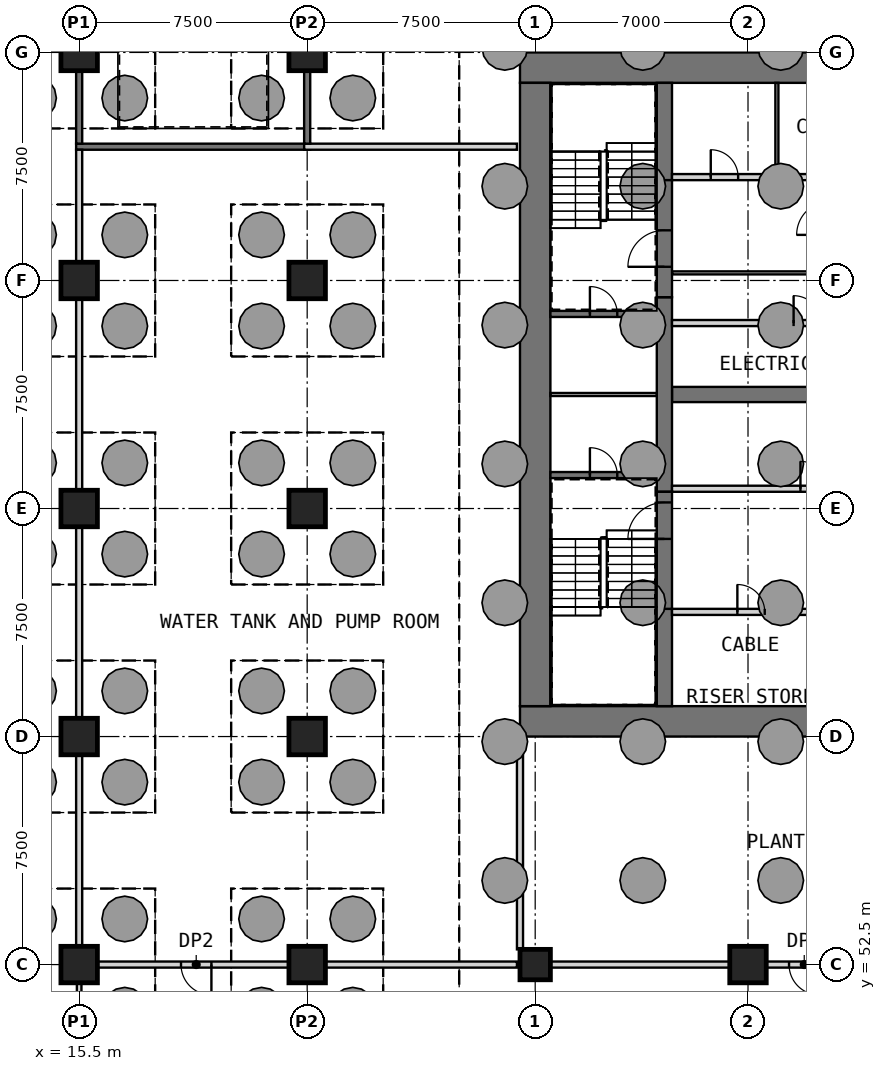
"""IFC4 building model, lengths in metres.
Left out: names, types, materials, properties, quantities, classifications, styles, units other than length and angle.
Written with IfcOpenShell. Run it as: python <this file> out.ifc"""

import sys

from ifc_helpers import new_model, si_unit, direction, frame, frame_2d, origin, origin_2d, place, context, subcontext, project, spatial, rectangle, extrude, element, fill, save


model = new_model("IFC4")
c1 = context("Model", 3, precision=1e-05, world=origin(), true_north=direction((0.0, 1.0)))
c2 = subcontext(c1, "Body", "Model", "MODEL_VIEW")
j1 = project(units=[si_unit("LENGTHUNIT", "METRE"), si_unit("PLANEANGLEUNIT", "RADIAN")], contexts=[c1])
p1 = place(None, origin())
s1 = spatial("IfcSite", under=j1, at=p1, CompositionType="ELEMENT")
p2 = place(p1, origin())
s2 = spatial("IfcBuilding", under=s1, at=p2, CompositionType="ELEMENT")
p3 = place(p2, frame((0.0, 0.0, -12.0)))
s3 = spatial("IfcBuildingStorey", under=s2, at=p3, CompositionType="ELEMENT", Elevation=-12.0)
p4 = place(p3, frame((30.5, 52.5, 0.0), z_axis=(0.0, 0.0, 1.0), x_axis=(1.0, 0.0, 0.0)))
e1 = element("IfcColumn", 1, at=p4, inside=s3, PredefinedType="COLUMN", context=c2, shape_type="SweptSolid", body=[
    extrude(rectangle(XDim=1.0, YDim=1.0, at=origin_2d()), origin(), (0.0, 0.0, 1.0), 6.0),
])
for number, where, z_axis, x_axis in (
    (2, (37.5, 52.5, 0.0), (0.0, 0.0, 1.0), (1.0, 0.0, 0.0)),
    (3, (15.5, 52.5, 0.0), (0.0, 0.0, 1.0), (1.0, 0.0, 0.0)),
    (4, (15.5, 60.0, 0.0), (0.0, 0.0, 1.0), (1.0, 0.0, 0.0)),
    (5, (15.5, 67.5, 0.0), (0.0, 0.0, 1.0), (1.0, 0.0, 0.0)),
    (6, (15.5, 75.0, 0.0), (0.0, 0.0, 1.0), (1.0, 0.0, 0.0)),
    (7, (15.5, 82.5, 0.0), (0.0, 0.0, 1.0), (1.0, 0.0, 0.0)),
    (8, (23.0, 52.5, 0.0), (0.0, 0.0, 1.0), (1.0, 0.0, 0.0)),
    (9, (23.0, 60.0, 0.0), (0.0, 0.0, 1.0), (1.0, 0.0, 0.0)),
    (10, (23.0, 67.5, 0.0), (0.0, 0.0, 1.0), (1.0, 0.0, 0.0)),
    (11, (23.0, 75.0, 0.0), (0.0, 0.0, 1.0), (1.0, 0.0, 0.0)),
    (12, (23.0, 82.5, 0.0), (0.0, 0.0, 1.0), (1.0, 0.0, 0.0)),
):
    element("IfcColumn", number, at=place(p3, frame(where, z_axis=z_axis, x_axis=x_axis)), inside=s3, PredefinedType="COLUMN", context=c2, shape_type="SweptSolid", body=[
        extrude(rectangle(XDim=1.2, YDim=1.2, at=origin_2d()), origin(), (0.0, 0.0, 1.0), 6.0),
    ])
p5 = place(p3, frame((30.0, 60.5, 0.0), z_axis=(0.0, 0.0, 1.0), x_axis=(1.0, 0.0, 0.0)))
e13 = element("IfcWall", 13, at=p5, inside=s3, PredefinedType="SHEAR", context=c2, shape_type="SweptSolid", body=[
    extrude(rectangle(XDim=30.0, YDim=1.0, at=frame_2d((15.0, 0.0))), origin(), (0.0, 0.0, 1.0), 6.0),
])
p6 = place(p5, frame((21.9, 0.0, 0.0)))
e14 = element("IfcOpeningElement", 14, at=p6, cuts=e13, PredefinedType="OPENING", context=c2, shape_type="SweptSolid", body=[
    extrude(rectangle(XDim=1.8, YDim=2.1, at=frame_2d((0.9, 1.05))), frame((0.0, 0.51, 0.0), z_axis=(0.0, -1.0, 0.0), x_axis=(1.0, 0.0, 0.0)), (0.0, 0.0, 1.0), 1.02),
])
p7 = place(p5, frame((26.5, 0.0, 0.0)))
e15 = element("IfcOpeningElement", 15, at=p7, cuts=e13, PredefinedType="OPENING", context=c2, shape_type="SweptSolid", body=[
    extrude(rectangle(XDim=1.2, YDim=2.1, at=frame_2d((0.6, 1.05))), frame((0.0, 0.51, 0.0), z_axis=(0.0, -1.0, 0.0), x_axis=(1.0, 0.0, 0.0)), (0.0, 0.0, 1.0), 1.02),
])
p8 = place(p3, frame((30.0, 82.0, 0.0), z_axis=(0.0, 0.0, 1.0), x_axis=(1.0, 0.0, 0.0)))
e16 = element("IfcWall", 16, at=p8, inside=s3, PredefinedType="SHEAR", context=c2, shape_type="SweptSolid", body=[
    extrude(rectangle(XDim=30.0, YDim=1.0, at=frame_2d((15.0, 0.0))), origin(), (0.0, 0.0, 1.0), 6.0),
])
p9 = place(p3, frame((30.5, 61.0, 0.0), z_axis=(0.0, 0.0, 1.0), x_axis=(0.0, 1.0, 0.0)))
e17 = element("IfcWall", 17, at=p9, inside=s3, PredefinedType="SHEAR", context=c2, shape_type="SweptSolid", body=[
    extrude(rectangle(XDim=20.5, YDim=1.0, at=frame_2d((10.25, 0.0))), origin(), (0.0, 0.0, 1.0), 6.0),
])
p10 = place(p3, frame((35.0, 71.25, 0.0), z_axis=(0.0, 0.0, 1.0), x_axis=(1.0, 0.0, 0.0)))
e18 = element("IfcWall", 18, at=p10, inside=s3, PredefinedType="SHEAR", context=c2, shape_type="SweptSolid", body=[
    extrude(rectangle(XDim=15.6, YDim=0.5, at=frame_2d((7.8, 0.0))), origin(), (0.0, 0.0, 1.0), 6.0),
])
p11 = place(p3, frame((34.75, 61.0, 0.0), z_axis=(0.0, 0.0, 1.0), x_axis=(0.0, 1.0, 0.0)))
e19 = element("IfcWall", 19, at=p11, inside=s3, PredefinedType="SHEAR", context=c2, shape_type="SweptSolid", body=[
    extrude(rectangle(XDim=3.2, YDim=0.5, at=frame_2d((1.6, 0.0))), origin(), (0.0, 0.0, 1.0), 6.0),
])
p12 = place(p3, frame((34.75, 68.05, 0.0), z_axis=(0.0, 0.0, 1.0), x_axis=(0.0, 1.0, 0.0)))
e20 = element("IfcWall", 20, at=p12, inside=s3, PredefinedType="SHEAR", context=c2, shape_type="SweptSolid", body=[
    extrude(rectangle(XDim=6.4, YDim=0.5, at=frame_2d((3.2, 0.0))), origin(), (0.0, 0.0, 1.0), 6.0),
])
p13 = place(p3, frame((34.75, 78.3, 0.0), z_axis=(0.0, 0.0, 1.0), x_axis=(0.0, 1.0, 0.0)))
e21 = element("IfcWall", 21, at=p13, inside=s3, PredefinedType="SHEAR", context=c2, shape_type="SweptSolid", body=[
    extrude(rectangle(XDim=3.2, YDim=0.5, at=frame_2d((1.6, 0.0))), origin(), (0.0, 0.0, 1.0), 6.0),
])
p14 = place(p3, frame((35.0, 64.1, 0.0), z_axis=(0.0, 0.0, 1.0), x_axis=(1.0, 0.0, 0.0)))
e22 = element("IfcWall", 22, at=p14, inside=s3, PredefinedType="PARTITIONING", context=c2, shape_type="SweptSolid", body=[
    extrude(rectangle(XDim=15.6, YDim=0.2, at=frame_2d((7.8, 0.0))), origin(), (0.0, 0.0, 1.0), 5.4),
])
p15 = place(p14, frame((2.15, 0.0, 0.0)))
e23 = element("IfcOpeningElement", 23, at=p15, cuts=e22, PredefinedType="OPENING", context=c2, shape_type="SweptSolid", body=[
    extrude(rectangle(XDim=0.9, YDim=2.1, at=frame_2d((0.45, 1.05))), frame((0.0, 0.11, 0.0), z_axis=(0.0, -1.0, 0.0), x_axis=(1.0, 0.0, 0.0)), (0.0, 0.0, 1.0), 0.22),
])
p16 = place(p14, frame((9.95, 0.0, 0.0)))
e24 = element("IfcOpeningElement", 24, at=p16, cuts=e22, PredefinedType="OPENING", context=c2, shape_type="SweptSolid", body=[
    extrude(rectangle(XDim=0.9, YDim=2.1, at=frame_2d((0.45, 1.05))), frame((0.0, 0.11, 0.0), z_axis=(0.0, -1.0, 0.0), x_axis=(1.0, 0.0, 0.0)), (0.0, 0.0, 1.0), 0.22),
])
p17 = place(p3, frame((35.0, 68.15, 0.0), z_axis=(0.0, 0.0, 1.0), x_axis=(1.0, 0.0, 0.0)))
e25 = element("IfcWall", 25, at=p17, inside=s3, PredefinedType="PARTITIONING", context=c2, shape_type="SweptSolid", body=[
    extrude(rectangle(XDim=15.6, YDim=0.2, at=frame_2d((7.8, 0.0))), origin(), (0.0, 0.0, 1.0), 5.4),
])
p18 = place(p17, frame((4.225, 0.0, 0.0)))
e26 = element("IfcOpeningElement", 26, at=p18, cuts=e25, PredefinedType="OPENING", context=c2, shape_type="SweptSolid", body=[
    extrude(rectangle(XDim=0.9, YDim=2.1, at=frame_2d((0.45, 1.05))), frame((0.0, 0.11, 0.0), z_axis=(0.0, -1.0, 0.0), x_axis=(1.0, 0.0, 0.0)), (0.0, 0.0, 1.0), 0.22),
])
p19 = place(p17, frame((12.025, 0.0, 0.0)))
e27 = element("IfcOpeningElement", 27, at=p19, cuts=e25, PredefinedType="OPENING", context=c2, shape_type="SweptSolid", body=[
    extrude(rectangle(XDim=0.9, YDim=2.1, at=frame_2d((0.45, 1.05))), frame((0.0, 0.11, 0.0), z_axis=(0.0, -1.0, 0.0), x_axis=(1.0, 0.0, 0.0)), (0.0, 0.0, 1.0), 0.22),
])
p20 = place(p3, frame((35.0, 73.6, 0.0), z_axis=(0.0, 0.0, 1.0), x_axis=(1.0, 0.0, 0.0)))
e28 = element("IfcWall", 28, at=p20, inside=s3, PredefinedType="PARTITIONING", context=c2, shape_type="SweptSolid", body=[
    extrude(rectangle(XDim=15.6, YDim=0.2, at=frame_2d((7.8, 0.0))), origin(), (0.0, 0.0, 1.0), 5.4),
])
p21 = place(p20, frame((4.0, 0.0, 0.0)))
e29 = element("IfcOpeningElement", 29, at=p21, cuts=e28, PredefinedType="OPENING", context=c2, shape_type="SweptSolid", body=[
    extrude(rectangle(XDim=0.9, YDim=2.1, at=frame_2d((0.45, 1.05))), frame((0.0, 0.11, 0.0), z_axis=(0.0, -1.0, 0.0), x_axis=(1.0, 0.0, 0.0)), (0.0, 0.0, 1.0), 0.22),
])
p22 = place(p20, frame((11.8, 0.0, 0.0)))
e30 = element("IfcOpeningElement", 30, at=p22, cuts=e28, PredefinedType="OPENING", context=c2, shape_type="SweptSolid", body=[
    extrude(rectangle(XDim=0.9, YDim=2.1, at=frame_2d((0.45, 1.05))), frame((0.0, 0.11, 0.0), z_axis=(0.0, -1.0, 0.0), x_axis=(1.0, 0.0, 0.0)), (0.0, 0.0, 1.0), 0.22),
])
p23 = place(p3, frame((35.0, 78.4, 0.0), z_axis=(0.0, 0.0, 1.0), x_axis=(1.0, 0.0, 0.0)))
e31 = element("IfcWall", 31, at=p23, inside=s3, PredefinedType="PARTITIONING", context=c2, shape_type="SweptSolid", body=[
    extrude(rectangle(XDim=10.4, YDim=0.2, at=frame_2d((5.2, 0.0))), origin(), (0.0, 0.0, 1.0), 5.4),
])
p24 = place(p23, frame((1.275, 0.0, 0.0)))
e32 = element("IfcOpeningElement", 32, at=p24, cuts=e31, PredefinedType="OPENING", context=c2, shape_type="SweptSolid", body=[
    extrude(rectangle(XDim=0.9, YDim=2.1, at=frame_2d((0.45, 1.05))), frame((0.0, 0.11, 0.0), z_axis=(0.0, -1.0, 0.0), x_axis=(1.0, 0.0, 0.0)), (0.0, 0.0, 1.0), 0.22),
])
p25 = place(p23, frame((6.475, 0.0, 0.0)))
e33 = element("IfcOpeningElement", 33, at=p25, cuts=e31, PredefinedType="OPENING", context=c2, shape_type="SweptSolid", body=[
    extrude(rectangle(XDim=0.9, YDim=2.1, at=frame_2d((0.45, 1.05))), frame((0.0, 0.11, 0.0), z_axis=(0.0, -1.0, 0.0), x_axis=(1.0, 0.0, 0.0)), (0.0, 0.0, 1.0), 0.22),
])
p26 = place(p3, frame((38.45, 78.5, 0.0), z_axis=(0.0, 0.0, 1.0), x_axis=(0.0, 1.0, 0.0)))
e34 = element("IfcWall", 34, at=p26, inside=s3, PredefinedType="PARTITIONING", context=c2, shape_type="SweptSolid", body=[
    extrude(rectangle(XDim=3.0, YDim=0.1, at=frame_2d((1.5, 0.0))), origin(), (0.0, 0.0, 1.0), 5.4),
])
p27 = place(p3, frame((35.0, 75.25, 0.0), z_axis=(0.0, 0.0, 1.0), x_axis=(1.0, 0.0, 0.0)))
e35 = element("IfcWall", 35, at=p27, inside=s3, PredefinedType="PARTITIONING", context=c2, shape_type="SweptSolid", body=[
    extrude(rectangle(XDim=5.25, YDim=0.1, at=frame_2d((2.625, 0.0))), origin(), (0.0, 0.0, 1.0), 5.4),
])
p28 = place(p3, frame((34.75, 64.2, 0.0), z_axis=(0.0, 0.0, 1.0), x_axis=(0.0, 1.0, 0.0)))
e36 = element("IfcWall", 36, at=p28, inside=s3, PredefinedType="SOLIDWALL", context=c2, shape_type="SweptSolid", body=[
    extrude(rectangle(XDim=3.85, YDim=0.5, at=frame_2d((1.925, 0.0))), origin(), (0.0, 0.0, 1.0), 4.8),
])
p29 = place(p28, frame((2.3, 0.0, 0.0)))
e37 = element("IfcOpeningElement", 37, at=p29, cuts=e36, PredefinedType="OPENING", context=c2, shape_type="SweptSolid", body=[
    extrude(rectangle(XDim=1.2, YDim=2.1, at=frame_2d((0.6, 1.05))), frame((0.0, 0.26, 0.0), z_axis=(0.0, -1.0, 0.0), x_axis=(1.0, 0.0, 0.0)), (0.0, 0.0, 1.0), 0.52),
])
p30 = place(p3, frame((34.75, 74.45, 0.0), z_axis=(0.0, 0.0, 1.0), x_axis=(0.0, 1.0, 0.0)))
e38 = element("IfcWall", 38, at=p30, inside=s3, PredefinedType="SOLIDWALL", context=c2, shape_type="SweptSolid", body=[
    extrude(rectangle(XDim=3.85, YDim=0.5, at=frame_2d((1.925, 0.0))), origin(), (0.0, 0.0, 1.0), 4.8),
])
p31 = place(p30, frame((1.0, 0.0, 0.0)))
e39 = element("IfcOpeningElement", 39, at=p31, cuts=e38, PredefinedType="OPENING", context=c2, shape_type="SweptSolid", body=[
    extrude(rectangle(XDim=1.2, YDim=2.1, at=frame_2d((0.6, 1.05))), frame((0.0, 0.26, 0.0), z_axis=(0.0, -1.0, 0.0), x_axis=(1.0, 0.0, 0.0)), (0.0, 0.0, 1.0), 0.52),
])
p32 = place(p3, frame((31.0, 68.6, 0.0), z_axis=(0.0, 0.0, 1.0), x_axis=(1.0, 0.0, 0.0)))
e40 = element("IfcWall", 40, at=p32, inside=s3, PredefinedType="SOLIDWALL", context=c2, shape_type="SweptSolid", body=[
    extrude(rectangle(XDim=3.5, YDim=0.2, at=frame_2d((1.75, 0.0))), origin(), (0.0, 0.0, 1.0), 5.4),
])
p33 = place(p32, frame((1.3, 0.0, 0.0)))
e41 = element("IfcOpeningElement", 41, at=p33, cuts=e40, PredefinedType="OPENING", context=c2, shape_type="SweptSolid", body=[
    extrude(rectangle(XDim=0.9, YDim=2.1, at=frame_2d((0.45, 1.05))), frame((0.0, 0.11, 0.0), z_axis=(0.0, -1.0, 0.0), x_axis=(1.0, 0.0, 0.0)), (0.0, 0.0, 1.0), 0.22),
])
p34 = place(p3, frame((31.0, 73.9, 0.0), z_axis=(0.0, 0.0, 1.0), x_axis=(1.0, 0.0, 0.0)))
e42 = element("IfcWall", 42, at=p34, inside=s3, PredefinedType="SOLIDWALL", context=c2, shape_type="SweptSolid", body=[
    extrude(rectangle(XDim=3.5, YDim=0.2, at=frame_2d((1.75, 0.0))), origin(), (0.0, 0.0, 1.0), 5.4),
])
p35 = place(p34, frame((1.3, 0.0, 0.0)))
e43 = element("IfcOpeningElement", 43, at=p35, cuts=e42, PredefinedType="OPENING", context=c2, shape_type="SweptSolid", body=[
    extrude(rectangle(XDim=0.9, YDim=2.1, at=frame_2d((0.45, 1.05))), frame((0.0, 0.11, 0.0), z_axis=(0.0, -1.0, 0.0), x_axis=(1.0, 0.0, 0.0)), (0.0, 0.0, 1.0), 0.22),
])
p36 = place(p3, frame((31.0, 71.25, 0.0), z_axis=(0.0, 0.0, 1.0), x_axis=(1.0, 0.0, 0.0)))
e44 = element("IfcWall", 44, at=p36, inside=s3, PredefinedType="PARTITIONING", context=c2, shape_type="SweptSolid", body=[
    extrude(rectangle(XDim=3.5, YDim=0.1, at=frame_2d((1.75, 0.0))), origin(), (0.0, 0.0, 1.0), 5.4),
])
p37 = place(p3, frame((22.4, 52.5, 0.0), z_axis=(0.0, 0.0, 1.0), x_axis=(-1.0, 0.0, 0.0)))
e45 = element("IfcWall", 45, at=p37, inside=s3, PredefinedType="PARTITIONING", context=c2, shape_type="SweptSolid", body=[
    extrude(rectangle(XDim=6.3, YDim=0.2, at=frame_2d((3.15, 0.0))), origin(), (0.0, 0.0, 1.0), 5.4),
])
p38 = place(p37, frame((2.55, 0.0, 0.0)))
e46 = element("IfcOpeningElement", 46, at=p38, cuts=e45, PredefinedType="OPENING", context=c2, shape_type="SweptSolid", body=[
    extrude(rectangle(XDim=1.0, YDim=2.1, at=frame_2d((0.5, 1.05))), frame((0.0, 0.11, 0.0), z_axis=(0.0, -1.0, 0.0), x_axis=(1.0, 0.0, 0.0)), (0.0, 0.0, 1.0), 0.22),
])
p39 = place(p3, frame((23.6, 52.5, 0.0), z_axis=(0.0, 0.0, 1.0), x_axis=(1.0, 0.0, 0.0)))
e47 = element("IfcWall", 47, at=p39, inside=s3, PredefinedType="PARTITIONING", context=c2, shape_type="SweptSolid", body=[
    extrude(rectangle(XDim=6.3, YDim=0.2, at=frame_2d((3.15, 0.0))), origin(), (0.0, 0.0, 1.0), 5.4),
])
p40 = place(p3, frame((31.0, 52.5, 0.0), z_axis=(0.0, 0.0, 1.0), x_axis=(1.0, 0.0, 0.0)))
e48 = element("IfcWall", 48, at=p40, inside=s3, PredefinedType="PARTITIONING", context=c2, shape_type="SweptSolid", body=[
    extrude(rectangle(XDim=5.9, YDim=0.2, at=frame_2d((2.95, 0.0))), origin(), (0.0, 0.0, 1.0), 5.4),
])
p41 = place(p3, frame((44.4, 52.5, 0.0), z_axis=(0.0, 0.0, 1.0), x_axis=(-1.0, 0.0, 0.0)))
e49 = element("IfcWall", 49, at=p41, inside=s3, PredefinedType="PARTITIONING", context=c2, shape_type="SweptSolid", body=[
    extrude(rectangle(XDim=6.3, YDim=0.2, at=frame_2d((3.15, 0.0))), origin(), (0.0, 0.0, 1.0), 5.4),
])
p42 = place(p41, frame((4.55, 0.0, 0.0)))
e50 = element("IfcOpeningElement", 50, at=p42, cuts=e49, PredefinedType="OPENING", context=c2, shape_type="SweptSolid", body=[
    extrude(rectangle(XDim=1.0, YDim=2.1, at=frame_2d((0.5, 1.05))), frame((0.0, 0.11, 0.0), z_axis=(0.0, -1.0, 0.0), x_axis=(1.0, 0.0, 0.0)), (0.0, 0.0, 1.0), 0.22),
])
p43 = place(p3, frame((15.4, 79.4, 0.0), z_axis=(0.0, 0.0, 1.0), x_axis=(1.0, 0.0, 0.0)))
e51 = element("IfcWall", 51, at=p43, inside=s3, PredefinedType="SHEAR", context=c2, shape_type="SweptSolid", body=[
    extrude(rectangle(XDim=7.7, YDim=0.2, at=frame_2d((3.85, 0.0))), origin(), (0.0, 0.0, 1.0), 5.4),
])
p44 = place(p3, frame((22.9, 79.4, 0.0), z_axis=(0.0, 0.0, 1.0), x_axis=(1.0, 0.0, 0.0)))
e52 = element("IfcWall", 52, at=p44, inside=s3, PredefinedType="PARTITIONING", context=c2, shape_type="SweptSolid", body=[
    extrude(rectangle(XDim=7.0, YDim=0.2, at=frame_2d((3.5, 0.0))), origin(), (0.0, 0.0, 1.0), 5.4),
])
p45 = place(p3, frame((15.5, 46.1, 0.0), z_axis=(0.0, 0.0, 1.0), x_axis=(0.0, 1.0, 0.0)))
e53 = element("IfcWall", 53, at=p45, inside=s3, PredefinedType="PARTITIONING", context=c2, shape_type="SweptSolid", body=[
    extrude(rectangle(XDim=5.8, YDim=0.15, at=frame_2d((2.9, 0.0))), origin(), (0.0, 0.0, 1.0), 5.4),
])
for number, where, z_axis, x_axis in (
    (54, (15.5, 53.1, 0.0), (0.0, 0.0, 1.0), (0.0, 1.0, 0.0)),
    (55, (15.5, 60.6, 0.0), (0.0, 0.0, 1.0), (0.0, 1.0, 0.0)),
    (56, (15.5, 68.1, 0.0), (0.0, 0.0, 1.0), (0.0, 1.0, 0.0)),
):
    element("IfcWall", number, at=place(p3, frame(where, z_axis=z_axis, x_axis=x_axis)), inside=s3, PredefinedType="PARTITIONING", context=c2, shape_type="SweptSolid", body=[
        extrude(rectangle(XDim=6.3, YDim=0.2, at=frame_2d((3.15, 0.0))), origin(), (0.0, 0.0, 1.0), 5.4),
    ])
p46 = place(p3, frame((15.5, 75.6, 0.0), z_axis=(0.0, 0.0, 1.0), x_axis=(0.0, 1.0, 0.0)))
e57 = element("IfcWall", 57, at=p46, inside=s3, PredefinedType="PARTITIONING", context=c2, shape_type="SweptSolid", body=[
    extrude(rectangle(XDim=3.7, YDim=0.2, at=frame_2d((1.85, 0.0))), origin(), (0.0, 0.0, 1.0), 5.4),
])
for number, where, z_axis, x_axis in (
    (58, (15.5, 79.5, 0.0), (0.0, 0.0, 1.0), (0.0, 1.0, 0.0)),
    (59, (23.0, 79.5, 0.0), (0.0, 0.0, 1.0), (0.0, 1.0, 0.0)),
):
    element("IfcWall", number, at=place(p3, frame(where, z_axis=z_axis, x_axis=x_axis)), inside=s3, PredefinedType="SHEAR", context=c2, shape_type="SweptSolid", body=[
        extrude(rectangle(XDim=2.4, YDim=0.2, at=frame_2d((1.2, 0.0))), origin(), (0.0, 0.0, 1.0), 5.4),
    ])
p47 = place(p3, frame((30.0, 53.0, 0.0), z_axis=(0.0, 0.0, 1.0), x_axis=(0.0, 1.0, 0.0)))
e60 = element("IfcWall", 60, at=p47, inside=s3, PredefinedType="PARTITIONING", context=c2, shape_type="SweptSolid", body=[
    extrude(rectangle(XDim=6.9, YDim=0.2, at=frame_2d((3.45, 0.0))), origin(), (0.0, 0.0, 1.0), 5.4),
])
p48 = place(p15, origin())
e61 = element("IfcDoor", 61, at=p48, inside=s3, OperationType="SINGLE_SWING_RIGHT", PredefinedType="DOOR", context=c2, shape_type="SweptSolid", body=[
    extrude(rectangle(XDim=0.9, YDim=2.1, at=frame_2d((0.45, 1.05))), frame((0.0, 0.025, 0.0), z_axis=(0.0, -1.0, 0.0), x_axis=(1.0, 0.0, 0.0)), (0.0, 0.0, 1.0), 0.05),
])
fill(e23, e61)
p49 = place(p18, origin())
e62 = element("IfcDoor", 62, at=p49, inside=s3, OperationType="SINGLE_SWING_RIGHT", PredefinedType="DOOR", context=c2, shape_type="SweptSolid", body=[
    extrude(rectangle(XDim=0.9, YDim=2.1, at=frame_2d((0.45, 1.05))), frame((0.0, 0.025, 0.0), z_axis=(0.0, -1.0, 0.0), x_axis=(1.0, 0.0, 0.0)), (0.0, 0.0, 1.0), 0.05),
])
fill(e26, e62)
p50 = place(p21, origin())
e63 = element("IfcDoor", 63, at=p50, inside=s3, OperationType="SINGLE_SWING_RIGHT", PredefinedType="DOOR", context=c2, shape_type="SweptSolid", body=[
    extrude(rectangle(XDim=0.9, YDim=2.1, at=frame_2d((0.45, 1.05))), frame((0.0, 0.025, 0.0), z_axis=(0.0, -1.0, 0.0), x_axis=(1.0, 0.0, 0.0)), (0.0, 0.0, 1.0), 0.05),
])
fill(e29, e63)
p51 = place(p24, origin())
e64 = element("IfcDoor", 64, at=p51, inside=s3, OperationType="SINGLE_SWING_RIGHT", PredefinedType="DOOR", context=c2, shape_type="SweptSolid", body=[
    extrude(rectangle(XDim=0.9, YDim=2.1, at=frame_2d((0.45, 1.05))), frame((0.0, 0.025, 0.0), z_axis=(0.0, -1.0, 0.0), x_axis=(1.0, 0.0, 0.0)), (0.0, 0.0, 1.0), 0.05),
])
fill(e32, e64)
p52 = place(p29, origin())
e65 = element("IfcDoor", 65, at=p52, inside=s3, OperationType="SINGLE_SWING_LEFT", PredefinedType="DOOR", context=c2, shape_type="SweptSolid", body=[
    extrude(rectangle(XDim=1.2, YDim=2.1, at=frame_2d((0.6, 1.05))), frame((0.0, 0.025, 0.0), z_axis=(0.0, -1.0, 0.0), x_axis=(1.0, 0.0, 0.0)), (0.0, 0.0, 1.0), 0.05),
])
fill(e37, e65)
p53 = place(p31, origin())
e66 = element("IfcDoor", 66, at=p53, inside=s3, OperationType="SINGLE_SWING_RIGHT", PredefinedType="DOOR", context=c2, shape_type="SweptSolid", body=[
    extrude(rectangle(XDim=1.2, YDim=2.1, at=frame_2d((0.6, 1.05))), frame((0.0, 0.025, 0.0), z_axis=(0.0, -1.0, 0.0), x_axis=(1.0, 0.0, 0.0)), (0.0, 0.0, 1.0), 0.05),
])
fill(e39, e66)
p54 = place(p33, origin())
e67 = element("IfcDoor", 67, at=p54, inside=s3, OperationType="SINGLE_SWING_LEFT", PredefinedType="DOOR", context=c2, shape_type="SweptSolid", body=[
    extrude(rectangle(XDim=0.9, YDim=2.1, at=frame_2d((0.45, 1.05))), frame((0.0, 0.025, 0.0), z_axis=(0.0, -1.0, 0.0), x_axis=(1.0, 0.0, 0.0)), (0.0, 0.0, 1.0), 0.05),
])
fill(e41, e67)
p55 = place(p35, origin())
e68 = element("IfcDoor", 68, at=p55, inside=s3, OperationType="SINGLE_SWING_RIGHT", PredefinedType="DOOR", context=c2, shape_type="SweptSolid", body=[
    extrude(rectangle(XDim=0.9, YDim=2.1, at=frame_2d((0.45, 1.05))), frame((0.0, 0.025, 0.0), z_axis=(0.0, -1.0, 0.0), x_axis=(1.0, 0.0, 0.0)), (0.0, 0.0, 1.0), 0.05),
])
fill(e43, e68)
p56 = place(p38, origin())
e69 = element("IfcDoor", 69, at=p56, inside=s3, OperationType="SINGLE_SWING_LEFT", PredefinedType="DOOR", context=c2, shape_type="SweptSolid", body=[
    extrude(rectangle(XDim=1.0, YDim=2.1, at=frame_2d((0.5, 1.05))), frame((0.0, 0.025, 0.0), z_axis=(0.0, -1.0, 0.0), x_axis=(1.0, 0.0, 0.0)), (0.0, 0.0, 1.0), 0.05),
])
fill(e46, e69)
p57 = place(p42, origin())
e70 = element("IfcDoor", 70, at=p57, inside=s3, OperationType="SINGLE_SWING_LEFT", PredefinedType="DOOR", context=c2, shape_type="SweptSolid", body=[
    extrude(rectangle(XDim=1.0, YDim=2.1, at=frame_2d((0.5, 1.05))), frame((0.0, 0.025, 0.0), z_axis=(0.0, -1.0, 0.0), x_axis=(1.0, 0.0, 0.0)), (0.0, 0.0, 1.0), 0.05),
])
fill(e50, e70)
save(model, sys.argv[1])
